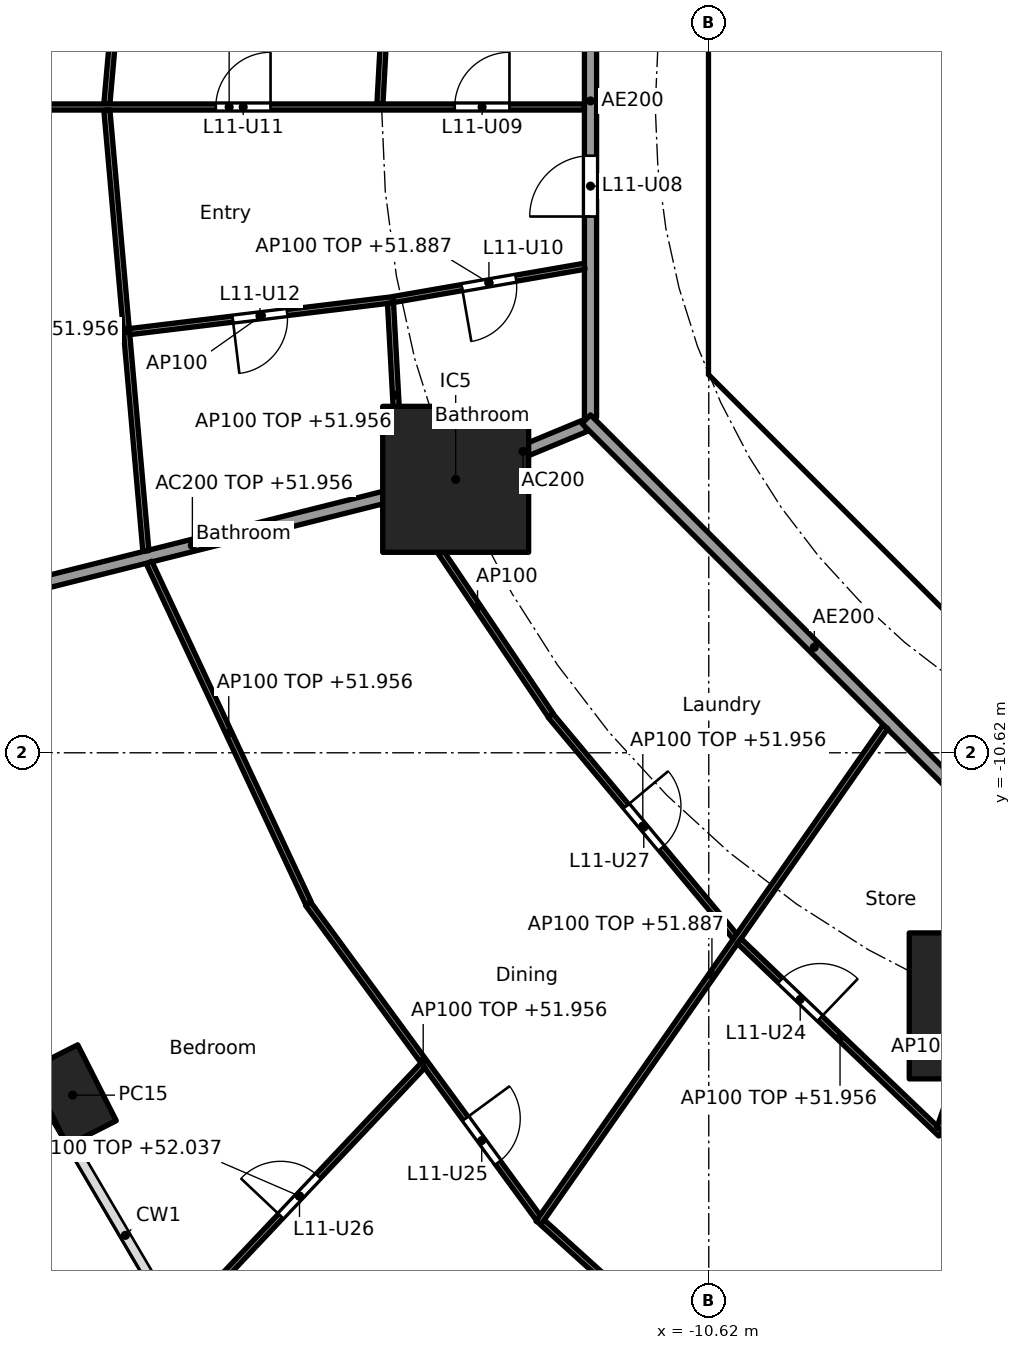
"""IFC4 building model, lengths in metres.
Left out: names, types, materials, properties, quantities, classifications, styles, units other than length and angle.
Written with IfcOpenShell. Run it as: python <this file> out.ifc"""

import sys

from ifc_helpers import new_model, si_unit, direction, frame, frame_2d, origin, origin_2d, place, context, subcontext, project, spatial, polyline, rectangle, hollow_rectangle, outline, extrude, element, fill, save


model = new_model("IFC4")
c1 = context("Model", 3, precision=1e-05, world=origin(), true_north=direction((0.0, 1.0)))
c2 = subcontext(c1, "Body", "Model", "MODEL_VIEW")
j1 = project(units=[si_unit("LENGTHUNIT", "METRE"), si_unit("PLANEANGLEUNIT", "RADIAN")], contexts=[c1])
p1 = place(None, origin())
s1 = spatial("IfcSite", under=j1, at=p1, CompositionType="ELEMENT")
p2 = place(p1, origin())
s2 = spatial("IfcBuilding", under=s1, at=p2, CompositionType="ELEMENT")
p3 = place(p2, frame((0.0, 0.0, 49.2)))
s3 = spatial("IfcBuildingStorey", under=s2, at=p3, CompositionType="ELEMENT", Elevation=49.2)
p4 = place(p3, frame((-21.082, -16.25, 0.0), z_axis=(0.0, 0.0, 1.0), x_axis=(0.452462697578, -0.891783329795, 0.0)))
e1 = element("IfcColumn", 1, at=p4, inside=s3, PredefinedType="COLUMN", context=c2, shape_type="SweptSolid", body=[
    extrude(hollow_rectangle(XDim=1.4, YDim=0.9, WallThickness=0.05, at=origin_2d()), origin(), (0.0, 0.0, 1.0), 3.7),
])
for number, where, z_axis, x_axis in (
    (2, (-14.782, -6.123, 0.0), (0.0, 0.0, 1.0), (1.0, 0.0, 0.0)),
    (3, (-6.123, -14.782, 0.0), (0.0, 0.0, 1.0), (1.0, 0.0, 0.0)),
):
    element("IfcColumn", number, at=place(p3, frame(where, z_axis=z_axis, x_axis=x_axis)), inside=s3, PredefinedType="COLUMN", context=c2, shape_type="SweptSolid", body=[
        extrude(rectangle(XDim=2.4, YDim=2.4, at=origin_2d()), origin(), (0.0, 0.0, 1.0), 3.7),
    ])
p5 = place(p3, frame((-10.325, 3.801, 0.0), z_axis=(0.0, 0.0, 1.0), x_axis=(0.0, -1.0, 0.0)))
e4 = element("IfcWall", 4, at=p5, inside=s3, PredefinedType="SHEAR", context=c2, shape_type="SweptSolid", body=[
    extrude(rectangle(XDim=7.602, YDim=0.6, at=frame_2d((3.801, 0.0))), origin(), (0.0, 0.0, 1.0), 3.44),
])
p6 = place(p5, frame((0.651, 0.0, 0.0)))
e5 = element("IfcOpeningElement", 5, at=p6, cuts=e4, PredefinedType="OPENING", context=c2, shape_type="SweptSolid", body=[
    extrude(rectangle(XDim=1.5, YDim=2.1, at=frame_2d((0.75, 1.05))), frame((0.0, 0.31, 0.0), z_axis=(0.0, -1.0, 0.0), x_axis=(1.0, 0.0, 0.0)), (0.0, 0.0, 1.0), 0.62),
])
p7 = place(p5, frame((5.451, 0.0, 0.0)))
e6 = element("IfcOpeningElement", 6, at=p7, cuts=e4, PredefinedType="OPENING", context=c2, shape_type="SweptSolid", body=[
    extrude(rectangle(XDim=1.5, YDim=2.1, at=frame_2d((0.75, 1.05))), frame((0.0, 0.31, 0.0), z_axis=(0.0, -1.0, 0.0), x_axis=(1.0, 0.0, 0.0)), (0.0, 0.0, 1.0), 0.62),
])
p8 = place(p3, frame((-9.988, -4.613, 0.0), z_axis=(0.0, 0.0, 1.0), x_axis=(0.707106781187, -0.707106781187, 0.0)))
e7 = element("IfcWall", 7, at=p8, inside=s3, PredefinedType="SHEAR", context=c2, shape_type="SweptSolid", body=[
    extrude(rectangle(XDim=7.602, YDim=0.6, at=frame_2d((3.801, 0.0))), origin(), (0.0, 0.0, 1.0), 3.44),
])
p9 = place(p8, frame((6.151, 0.0, 0.0)))
e8 = element("IfcOpeningElement", 8, at=p9, cuts=e7, PredefinedType="OPENING", context=c2, shape_type="SweptSolid", body=[
    extrude(rectangle(XDim=1.1, YDim=2.1, at=frame_2d((0.55, 1.05))), frame((0.0, 0.31, 0.0), z_axis=(0.0, -1.0, 0.0), x_axis=(1.0, 0.0, 0.0)), (0.0, 0.0, 1.0), 0.62),
])
p10 = place(p3, origin())
e9 = element("IfcWall", 9, at=p10, inside=s3, PredefinedType="SHEAR", context=c2, shape_type="SweptSolid", body=[
    extrude(outline(polyline([(-10.625, -3.801), (-10.025, -3.801), (-10.025, -4.152), (-9.776, -4.401), (-10.2, -4.825), (-10.625, -4.401), (-10.625, -3.801)])), origin(), (0.0, 0.0, 1.0), 3.44),
])
p11 = place(p3, frame((-10.025, -4.0, 0.0), z_axis=(0.0, 0.0, 1.0), x_axis=(1.0, 0.0, 0.0)))
e10 = element("IfcWall", 10, at=p11, inside=s3, PredefinedType="PARTITIONING", context=c2, shape_type="SweptSolid", body=[
    extrude(rectangle(XDim=3.325, YDim=0.2, at=frame_2d((1.662, 0.0))), origin(), (0.0, 0.0, 1.0), 3.44),
])
p12 = place(p3, frame((-12.657, -5.243, 0.0), z_axis=(0.0, 0.0, 1.0), x_axis=(-0.923885664896, -0.382668627144, 0.0)))
e11 = element("IfcWall", 11, at=p12, inside=s3, PredefinedType="PARTITIONING", context=c2, shape_type="SweptSolid", body=[
    extrude(rectangle(XDim=2.2, YDim=0.2, at=frame_2d((1.1, 0.0))), origin(), (0.0, 0.0, 1.0), 3.44),
])
p13 = place(p3, frame((-14.831, -6.135, 0.0), z_axis=(0.0, 0.0, 1.0), x_axis=(-0.969884949569, -0.243563512454, 0.0)))
e12 = element("IfcWall", 12, at=p13, inside=s3, PredefinedType="PARTITIONING", context=c2, shape_type="SweptSolid", body=[
    extrude(rectangle(XDim=8.829, YDim=0.2, at=frame_2d((4.415, 0.0))), origin(), (0.0, 0.0, 1.0), 2.756),
])
p14 = place(p3, frame((-12.565, 5.304, 0.0), z_axis=(0.0, 0.0, 1.0), x_axis=(0.0, -1.0, 0.0)))
e13 = element("IfcWall", 13, at=p14, inside=s3, PredefinedType="PARTITIONING", context=c2, shape_type="SweptSolid", body=[
    extrude(rectangle(XDim=10.409, YDim=0.2, at=frame_2d((5.205, 0.0))), origin(), (0.0, 0.0, 1.0), 3.44),
])
p15 = place(p14, frame((6.106, 0.0, 0.0)))
e14 = element("IfcOpeningElement", 14, at=p15, cuts=e13, PredefinedType="OPENING", context=c2, shape_type="SweptSolid", body=[
    extrude(rectangle(XDim=1.0, YDim=2.1, at=frame_2d((0.5, 1.05))), frame((0.0, 0.11, 0.0), z_axis=(0.0, -1.0, 0.0), x_axis=(1.0, 0.0, 0.0)), (0.0, 0.0, 1.0), 0.22),
])
p16 = place(p3, frame((-12.635, -5.134, 0.0), z_axis=(0.0, 0.0, 1.0), x_axis=(0.707106781187, -0.707106781187, 0.0)))
e15 = element("IfcWall", 15, at=p16, inside=s3, PredefinedType="PARTITIONING", context=c2, shape_type="SweptSolid", body=[
    extrude(rectangle(XDim=10.609, YDim=0.2, at=frame_2d((5.305, 0.0))), origin(), (0.0, 0.0, 1.0), 3.44),
])
p17 = place(p3, frame((-15.688, 6.249, 0.0), z_axis=(0.0, 0.0, 1.0), x_axis=(-0.054659814056, -0.998505034903, 0.0)))
e16 = element("IfcWall", 16, at=p17, inside=s3, PredefinedType="PARTITIONING", context=c2, shape_type="SweptSolid", body=[
    extrude(rectangle(XDim=6.208, YDim=0.1, at=frame_2d((3.104, 0.0))), origin(), (0.0, 0.0, 1.0), 2.756),
])
p18 = place(p3, frame((-19.877, 7.301, 0.0), z_axis=(0.0, 0.0, 1.0), x_axis=(-0.088143415068, -0.996107794558, 0.0)))
e17 = element("IfcWall", 17, at=p18, inside=s3, PredefinedType="PARTITIONING", context=c2, shape_type="SweptSolid", body=[
    extrude(rectangle(XDim=7.279, YDim=0.1, at=frame_2d((3.64, 0.0))), origin(), (0.0, 0.0, 1.0), 2.756),
])
p19 = place(p18, frame((3.189, 0.0, 0.0)))
e18 = element("IfcOpeningElement", 18, at=p19, cuts=e17, PredefinedType="OPENING", context=c2, shape_type="SweptSolid", body=[
    extrude(rectangle(XDim=0.9, YDim=2.1, at=frame_2d((0.45, 1.05))), frame((0.0, 0.06, 0.0), z_axis=(0.0, -1.0, 0.0), x_axis=(1.0, 0.0, 0.0)), (0.0, 0.0, 1.0), 0.12),
])
p20 = place(p3, frame((-12.665, 0.0, 0.0), z_axis=(0.0, 0.0, 1.0), x_axis=(-1.0, 0.0, 0.0)))
e19 = element("IfcWall", 19, at=p20, inside=s3, PredefinedType="PARTITIONING", context=c2, shape_type="SweptSolid", body=[
    extrude(rectangle(XDim=11.685, YDim=0.1, at=frame_2d((5.843, 0.0))), origin(), (0.0, 0.0, 1.0), 2.687),
])
p21 = place(p20, frame((1.233, 0.0, 0.0)))
e20 = element("IfcOpeningElement", 20, at=p21, cuts=e19, PredefinedType="OPENING", context=c2, shape_type="SweptSolid", body=[
    extrude(rectangle(XDim=0.9, YDim=2.1, at=frame_2d((0.45, 1.05))), frame((0.0, 0.06, 0.0), z_axis=(0.0, -1.0, 0.0), x_axis=(1.0, 0.0, 0.0)), (0.0, 0.0, 1.0), 0.12),
])
p22 = place(p20, frame((5.162, 0.0, 0.0)))
e21 = element("IfcOpeningElement", 21, at=p22, cuts=e19, PredefinedType="OPENING", context=c2, shape_type="SweptSolid", body=[
    extrude(rectangle(XDim=0.9, YDim=2.1, at=frame_2d((0.45, 1.05))), frame((0.0, 0.06, 0.0), z_axis=(0.0, -1.0, 0.0), x_axis=(1.0, 0.0, 0.0)), (0.0, 0.0, 1.0), 0.12),
])
p23 = place(p20, frame((9.322, 0.0, 0.0)))
e22 = element("IfcOpeningElement", 22, at=p23, cuts=e19, PredefinedType="OPENING", context=c2, shape_type="SweptSolid", body=[
    extrude(rectangle(XDim=0.9, YDim=2.1, at=frame_2d((0.45, 1.05))), frame((0.0, 0.06, 0.0), z_axis=(0.0, -1.0, 0.0), x_axis=(1.0, 0.0, 0.0)), (0.0, 0.0, 1.0), 0.12),
])
p24 = place(p3, frame((-20.518, -0.05, 0.0), z_axis=(0.0, 0.0, 1.0), x_axis=(0.088143415068, -0.996107794558, 0.0)))
e23 = element("IfcWall", 23, at=p24, inside=s3, PredefinedType="PARTITIONING", context=c2, shape_type="SweptSolid", body=[
    extrude(rectangle(XDim=7.279, YDim=0.1, at=frame_2d((3.64, 0.0))), origin(), (0.0, 0.0, 1.0), 2.756),
])
p25 = place(p3, frame((-12.663, -2.619, 0.0), z_axis=(0.0, 0.0, 1.0), x_axis=(-0.985220176102, -0.171292745325, 0.0)))
e24 = element("IfcWall", 24, at=p25, inside=s3, PredefinedType="PARTITIONING", context=c2, shape_type="SweptSolid", body=[
    extrude(rectangle(XDim=3.191, YDim=0.1, at=frame_2d((1.596, 0.0))), origin(), (0.0, 0.0, 1.0), 2.687),
])
p26 = place(p25, frame((1.146, 0.0, 0.0)))
e25 = element("IfcOpeningElement", 25, at=p26, cuts=e24, PredefinedType="OPENING", context=c2, shape_type="SweptSolid", body=[
    extrude(rectangle(XDim=0.9, YDim=2.1, at=frame_2d((0.45, 1.05))), frame((0.0, 0.06, 0.0), z_axis=(0.0, -1.0, 0.0), x_axis=(1.0, 0.0, 0.0)), (0.0, 0.0, 1.0), 0.12),
])
p27 = place(p3, frame((-15.807, -3.168, 0.0), z_axis=(0.0, 0.0, 1.0), x_axis=(-0.992741666002, -0.120266306938, 0.0)))
e26 = element("IfcWall", 26, at=p27, inside=s3, PredefinedType="PARTITIONING", context=c2, shape_type="SweptSolid", body=[
    extrude(rectangle(XDim=4.371, YDim=0.1, at=frame_2d((2.185, 0.0))), origin(), (0.0, 0.0, 1.0), 3.44),
])
p28 = place(p27, frame((1.76, 0.0, 0.0)))
e27 = element("IfcOpeningElement", 27, at=p28, cuts=e26, PredefinedType="OPENING", context=c2, shape_type="SweptSolid", body=[
    extrude(rectangle(XDim=0.9, YDim=2.1, at=frame_2d((0.45, 1.05))), frame((0.0, 0.06, 0.0), z_axis=(0.0, -1.0, 0.0), x_axis=(1.0, 0.0, 0.0)), (0.0, 0.0, 1.0), 0.12),
])
p29 = place(p3, frame((-15.854, -3.225, 0.0), z_axis=(0.0, 0.0, 1.0), x_axis=(0.054644199943, -0.998505889523, 0.0)))
e28 = element("IfcWall", 28, at=p29, inside=s3, PredefinedType="PARTITIONING", context=c2, shape_type="SweptSolid", body=[
    extrude(rectangle(XDim=3.029, YDim=0.1, at=frame_2d((1.515, 0.0))), origin(), (0.0, 0.0, 1.0), 2.756),
])
p30 = place(p3, frame((-15.627, -6.432, 0.0), z_axis=(0.0, 0.0, 1.0), x_axis=(0.559112679527, -0.829091678641, 0.0)))
e29 = element("IfcWall", 29, at=p30, inside=s3, PredefinedType="PARTITIONING", context=c2, shape_type="SweptSolid", body=[
    extrude(rectangle(XDim=4.308, YDim=0.1, at=frame_2d((2.154, 0.0))), origin(), (0.0, 0.0, 1.0), 3.44),
])
p31 = place(p3, frame((-19.826, -7.491, 0.0), z_axis=(0.0, 0.0, 1.0), x_axis=(0.423926333401, -0.905696673202, 0.0)))
e30 = element("IfcWall", 30, at=p31, inside=s3, PredefinedType="PARTITIONING", context=c2, shape_type="SweptSolid", body=[
    extrude(rectangle(XDim=6.188, YDim=0.1, at=frame_2d((3.094, 0.0))), origin(), (0.0, 0.0, 1.0), 2.756),
])
p32 = place(p3, frame((-13.222, -10.007, 0.0), z_axis=(0.0, 0.0, 1.0), x_axis=(0.640807748916, -0.767701393075, 0.0)))
e31 = element("IfcWall", 31, at=p32, inside=s3, PredefinedType="PARTITIONING", context=c2, shape_type="SweptSolid", body=[
    extrude(rectangle(XDim=4.737, YDim=0.1, at=frame_2d((2.368, 0.0))), origin(), (0.0, 0.0, 1.0), 2.756),
])
p33 = place(p32, frame((1.943, 0.0, 0.0)))
e32 = element("IfcOpeningElement", 32, at=p33, cuts=e31, PredefinedType="OPENING", context=c2, shape_type="SweptSolid", body=[
    extrude(rectangle(XDim=0.9, YDim=2.1, at=frame_2d((0.45, 1.05))), frame((0.0, 0.06, 0.0), z_axis=(0.0, -1.0, 0.0), x_axis=(1.0, 0.0, 0.0)), (0.0, 0.0, 1.0), 0.12),
])
p34 = place(p3, frame((-17.211, -13.1, 0.0), z_axis=(0.0, 0.0, 1.0), x_axis=(0.591206785834, -0.806520016109, 0.0)))
e33 = element("IfcWall", 33, at=p34, inside=s3, PredefinedType="PARTITIONING", context=c2, shape_type="SweptSolid", body=[
    extrude(rectangle(XDim=6.41, YDim=0.1, at=frame_2d((3.205, 0.0))), origin(), (0.0, 0.0, 1.0), 2.756),
])
p35 = place(p34, frame((4.383, 0.0, 0.0)))
e34 = element("IfcOpeningElement", 34, at=p35, cuts=e33, PredefinedType="OPENING", context=c2, shape_type="SweptSolid", body=[
    extrude(rectangle(XDim=0.9, YDim=2.1, at=frame_2d((0.45, 1.05))), frame((0.0, 0.06, 0.0), z_axis=(0.0, -1.0, 0.0), x_axis=(1.0, 0.0, 0.0)), (0.0, 0.0, 1.0), 0.12),
])
p36 = place(p3, frame((-15.321, -15.761, 0.0), z_axis=(0.0, 0.0, 1.0), x_axis=(-0.686519245775, -0.727111631856, 0.0)))
e35 = element("IfcWall", 35, at=p36, inside=s3, PredefinedType="PARTITIONING", context=c2, shape_type="SweptSolid", body=[
    extrude(rectangle(XDim=5.912, YDim=0.1, at=frame_2d((2.956, 0.0))), origin(), (0.0, 0.0, 1.0), 2.837),
])
p37 = place(p36, frame((2.506, 0.0, 0.0)))
e36 = element("IfcOpeningElement", 36, at=p37, cuts=e35, PredefinedType="OPENING", context=c2, shape_type="SweptSolid", body=[
    extrude(rectangle(XDim=0.9, YDim=2.1, at=frame_2d((0.45, 1.05))), frame((0.0, 0.06, 0.0), z_axis=(0.0, -1.0, 0.0), x_axis=(1.0, 0.0, 0.0)), (0.0, 0.0, 1.0), 0.12),
])
p38 = place(p3, frame((-7.715, -10.193, 0.0), z_axis=(0.0, 0.0, 1.0), x_axis=(-0.573126502256, -0.819466907454, 0.0)))
e37 = element("IfcWall", 37, at=p38, inside=s3, PredefinedType="PARTITIONING", context=c2, shape_type="SweptSolid", body=[
    extrude(rectangle(XDim=9.954, YDim=0.1, at=frame_2d((4.977, 0.0))), origin(), (0.0, 0.0, 1.0), 2.687),
])
p39 = place(p3, frame((-10.119, -13.716, 0.0), z_axis=(0.0, 0.0, 1.0), x_axis=(0.722763212502, -0.69109575216, 0.0)))
e38 = element("IfcWall", 38, at=p39, inside=s3, PredefinedType="PARTITIONING", context=c2, shape_type="SweptSolid", body=[
    extrude(rectangle(XDim=4.587, YDim=0.1, at=frame_2d((2.293, 0.0))), origin(), (0.0, 0.0, 1.0), 2.756),
])
p40 = place(p39, frame((0.938, 0.0, 0.0)))
e39 = element("IfcOpeningElement", 39, at=p40, cuts=e38, PredefinedType="OPENING", context=c2, shape_type="SweptSolid", body=[
    extrude(rectangle(XDim=0.9, YDim=2.1, at=frame_2d((0.45, 1.05))), frame((0.0, 0.06, 0.0), z_axis=(0.0, -1.0, 0.0), x_axis=(1.0, 0.0, 0.0)), (0.0, 0.0, 1.0), 0.12),
])
p41 = place(p3, frame((-13.355, -18.343, 0.0), z_axis=(0.0, 0.0, 1.0), x_axis=(0.741720189244, -0.670709445936, 0.0)))
e40 = element("IfcWall", 40, at=p41, inside=s3, PredefinedType="PARTITIONING", context=c2, shape_type="SweptSolid", body=[
    extrude(rectangle(XDim=6.209, YDim=0.1, at=frame_2d((3.104, 0.0))), origin(), (0.0, 0.0, 1.0), 2.756),
])
p42 = place(p41, frame((2.63, 0.0, 0.0)))
e41 = element("IfcOpeningElement", 41, at=p42, cuts=e40, PredefinedType="OPENING", context=c2, shape_type="SweptSolid", body=[
    extrude(rectangle(XDim=0.9, YDim=2.1, at=frame_2d((0.45, 1.05))), frame((0.0, 0.06, 0.0), z_axis=(0.0, -1.0, 0.0), x_axis=(1.0, 0.0, 0.0)), (0.0, 0.0, 1.0), 0.12),
])
p43 = place(p3, frame((-6.139, -14.83, 0.0), z_axis=(0.0, 0.0, 1.0), x_axis=(-0.327246993321, -0.944938836837, 0.0)))
e42 = element("IfcWall", 42, at=p43, inside=s3, PredefinedType="PARTITIONING", context=c2, shape_type="SweptSolid", body=[
    extrude(rectangle(XDim=2.09, YDim=0.1, at=frame_2d((1.045, 0.0))), origin(), (0.0, 0.0, 1.0), 3.44),
])
p44 = place(p3, frame((-6.791, -16.862, 0.0), z_axis=(0.0, 0.0, 1.0), x_axis=(0.979581941859, -0.201045316246, 0.0)))
e43 = element("IfcWall", 43, at=p44, inside=s3, PredefinedType="PARTITIONING", context=c2, shape_type="SweptSolid", body=[
    extrude(rectangle(XDim=2.256, YDim=0.1, at=frame_2d((1.128, 0.0))), origin(), (0.0, 0.0, 1.0), 2.756),
])
p45 = place(p3, frame((-3.492, -12.662, 0.0), z_axis=(0.0, 0.0, 1.0), x_axis=(-0.219268088006, -0.975664648115, 0.0)))
e44 = element("IfcWall", 44, at=p45, inside=s3, PredefinedType="PARTITIONING", context=c2, shape_type="SweptSolid", body=[
    extrude(rectangle(XDim=18.23, YDim=0.1, at=frame_2d((9.115, 0.0))), origin(), (0.0, 0.0, 1.0), 2.687),
])
p46 = place(p45, frame((0.35, 0.0, 0.0)))
e45 = element("IfcOpeningElement", 45, at=p46, cuts=e44, PredefinedType="OPENING", context=c2, shape_type="SweptSolid", body=[
    extrude(rectangle(XDim=0.9, YDim=2.1, at=frame_2d((0.45, 1.05))), frame((0.0, 0.06, 0.0), z_axis=(0.0, -1.0, 0.0), x_axis=(1.0, 0.0, 0.0)), (0.0, 0.0, 1.0), 0.12),
])
p47 = place(p45, frame((7.497, 0.0, 0.0)))
e46 = element("IfcOpeningElement", 46, at=p47, cuts=e44, PredefinedType="OPENING", context=c2, shape_type="SweptSolid", body=[
    extrude(rectangle(XDim=0.9, YDim=2.1, at=frame_2d((0.45, 1.05))), frame((0.0, 0.06, 0.0), z_axis=(0.0, -1.0, 0.0), x_axis=(1.0, 0.0, 0.0)), (0.0, 0.0, 1.0), 0.12),
])
p48 = place(p45, frame((14.223, 0.0, 0.0)))
e47 = element("IfcOpeningElement", 47, at=p48, cuts=e44, PredefinedType="OPENING", context=c2, shape_type="SweptSolid", body=[
    extrude(rectangle(XDim=0.9, YDim=2.1, at=frame_2d((0.45, 1.05))), frame((0.0, 0.06, 0.0), z_axis=(0.0, -1.0, 0.0), x_axis=(1.0, 0.0, 0.0)), (0.0, 0.0, 1.0), 0.12),
])
p49 = place(p7, origin())
e48 = element("IfcDoor", 48, at=p49, inside=s3, OperationType="DOUBLE_DOOR_SINGLE_SWING", PredefinedType="DOOR", context=c2, shape_type="SweptSolid", body=[
    extrude(rectangle(XDim=1.5, YDim=2.1, at=frame_2d((0.75, 1.05))), frame((0.0, 0.025, 0.0), z_axis=(0.0, -1.0, 0.0), x_axis=(1.0, 0.0, 0.0)), (0.0, 0.0, 1.0), 0.05),
])
fill(e6, e48)
p50 = place(p15, frame((1.0, 0.0, 0.0), x_axis=(-1.0, 0.0, 0.0)))
e49 = element("IfcDoor", 49, at=p50, inside=s3, OperationType="SINGLE_SWING_LEFT", PredefinedType="DOOR", context=c2, shape_type="SweptSolid", body=[
    extrude(rectangle(XDim=1.0, YDim=2.1, at=frame_2d((0.5, 1.05))), frame((0.0, 0.025, 0.0), z_axis=(0.0, -1.0, 0.0), x_axis=(1.0, 0.0, 0.0)), (0.0, 0.0, 1.0), 0.05),
])
fill(e14, e49)
p51 = place(p21, frame((0.9, 0.0, 0.0), x_axis=(-1.0, 0.0, 0.0)))
e50 = element("IfcDoor", 50, at=p51, inside=s3, OperationType="SINGLE_SWING_RIGHT", PredefinedType="DOOR", context=c2, shape_type="SweptSolid", body=[
    extrude(rectangle(XDim=0.9, YDim=2.1, at=frame_2d((0.45, 1.05))), frame((0.0, 0.025, 0.0), z_axis=(0.0, -1.0, 0.0), x_axis=(1.0, 0.0, 0.0)), (0.0, 0.0, 1.0), 0.05),
])
fill(e20, e50)
p52 = place(p26, origin())
e51 = element("IfcDoor", 51, at=p52, inside=s3, OperationType="SINGLE_SWING_RIGHT", PredefinedType="DOOR", context=c2, shape_type="SweptSolid", body=[
    extrude(rectangle(XDim=0.9, YDim=2.1, at=frame_2d((0.45, 1.05))), frame((0.0, 0.025, 0.0), z_axis=(0.0, -1.0, 0.0), x_axis=(1.0, 0.0, 0.0)), (0.0, 0.0, 1.0), 0.05),
])
fill(e25, e51)
p53 = place(p22, frame((0.9, 0.0, 0.0), x_axis=(-1.0, 0.0, 0.0)))
e52 = element("IfcDoor", 52, at=p53, inside=s3, OperationType="SINGLE_SWING_RIGHT", PredefinedType="DOOR", context=c2, shape_type="SweptSolid", body=[
    extrude(rectangle(XDim=0.9, YDim=2.1, at=frame_2d((0.45, 1.05))), frame((0.0, 0.025, 0.0), z_axis=(0.0, -1.0, 0.0), x_axis=(1.0, 0.0, 0.0)), (0.0, 0.0, 1.0), 0.05),
])
fill(e21, e52)
p54 = place(p28, origin())
e53 = element("IfcDoor", 53, at=p54, inside=s3, OperationType="SINGLE_SWING_RIGHT", PredefinedType="DOOR", context=c2, shape_type="SweptSolid", body=[
    extrude(rectangle(XDim=0.9, YDim=2.1, at=frame_2d((0.45, 1.05))), frame((0.0, 0.025, 0.0), z_axis=(0.0, -1.0, 0.0), x_axis=(1.0, 0.0, 0.0)), (0.0, 0.0, 1.0), 0.05),
])
fill(e27, e53)
p55 = place(p40, origin())
e54 = element("IfcDoor", 54, at=p55, inside=s3, OperationType="SINGLE_SWING_RIGHT", PredefinedType="DOOR", context=c2, shape_type="SweptSolid", body=[
    extrude(rectangle(XDim=0.9, YDim=2.1, at=frame_2d((0.45, 1.05))), frame((0.0, 0.025, 0.0), z_axis=(0.0, -1.0, 0.0), x_axis=(1.0, 0.0, 0.0)), (0.0, 0.0, 1.0), 0.05),
])
fill(e39, e54)
p56 = place(p35, origin())
e55 = element("IfcDoor", 55, at=p56, inside=s3, OperationType="SINGLE_SWING_LEFT", PredefinedType="DOOR", context=c2, shape_type="SweptSolid", body=[
    extrude(rectangle(XDim=0.9, YDim=2.1, at=frame_2d((0.45, 1.05))), frame((0.0, 0.025, 0.0), z_axis=(0.0, -1.0, 0.0), x_axis=(1.0, 0.0, 0.0)), (0.0, 0.0, 1.0), 0.05),
])
fill(e34, e55)
p57 = place(p37, frame((0.9, 0.0, 0.0), x_axis=(-1.0, 0.0, 0.0)))
e56 = element("IfcDoor", 56, at=p57, inside=s3, OperationType="SINGLE_SWING_LEFT", PredefinedType="DOOR", context=c2, shape_type="SweptSolid", body=[
    extrude(rectangle(XDim=0.9, YDim=2.1, at=frame_2d((0.45, 1.05))), frame((0.0, 0.025, 0.0), z_axis=(0.0, -1.0, 0.0), x_axis=(1.0, 0.0, 0.0)), (0.0, 0.0, 1.0), 0.05),
])
fill(e36, e56)
p58 = place(p33, origin())
e57 = element("IfcDoor", 57, at=p58, inside=s3, OperationType="SINGLE_SWING_LEFT", PredefinedType="DOOR", context=c2, shape_type="SweptSolid", body=[
    extrude(rectangle(XDim=0.9, YDim=2.1, at=frame_2d((0.45, 1.05))), frame((0.0, 0.025, 0.0), z_axis=(0.0, -1.0, 0.0), x_axis=(1.0, 0.0, 0.0)), (0.0, 0.0, 1.0), 0.05),
])
fill(e32, e57)
save(model, sys.argv[1])
